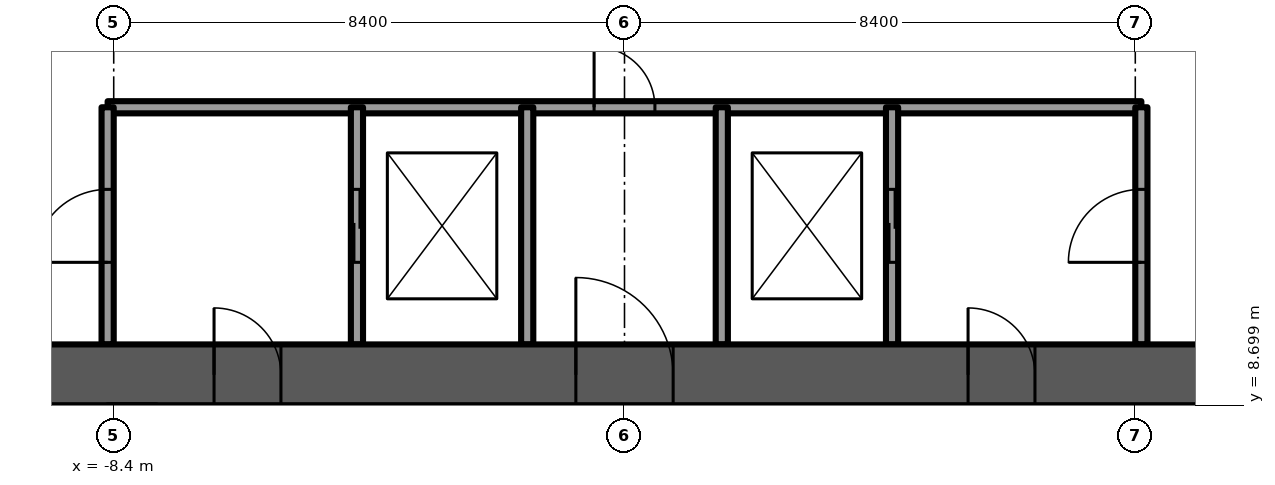
"""IFC4 building model, lengths in metres.
Left out: names, types, materials, properties, quantities, classifications, styles, units other than length and angle.
Written with IfcOpenShell. Run it as: python <this file> out.ifc"""

import sys

from ifc_helpers import new_model, si_unit, direction, frame, frame_2d, origin, place, context, subcontext, project, spatial, rectangle, extrude, element, fill, save


model = new_model("IFC4")
c1 = context("Model", 3, precision=1e-05, world=origin(), true_north=direction((0.0, 1.0)))
c2 = subcontext(c1, "Body", "Model", "MODEL_VIEW")
j1 = project(units=[si_unit("LENGTHUNIT", "METRE"), si_unit("PLANEANGLEUNIT", "RADIAN")], contexts=[c1])
p1 = place(None, origin())
s1 = spatial("IfcSite", under=j1, at=p1, CompositionType="ELEMENT")
p2 = place(p1, origin())
s2 = spatial("IfcBuilding", under=s1, at=p2, CompositionType="ELEMENT")
p3 = place(p2, frame((0.0, 0.0, 93.0)))
s3 = spatial("IfcBuildingStorey", under=s2, at=p3, CompositionType="ELEMENT", Elevation=93.0)
p4 = place(p3, frame((-12.0, 9.2, -0.3), z_axis=(0.0, 0.0, 1.0), x_axis=(1.0, 0.0, 0.0)))
e1 = element("IfcWall", 1, at=p4, inside=s3, PredefinedType="SHEAR", context=c2, shape_type="SweptSolid", body=[
    extrude(rectangle(XDim=24.0, YDim=1.0, at=frame_2d((12.0, 0.0))), origin(), (0.0, 0.0, 1.0), 3.75),
])
p5 = place(p4, frame((11.2, 0.0, 0.0)))
e2 = element("IfcOpeningElement", 2, at=p5, cuts=e1, PredefinedType="OPENING", context=c2, shape_type="SweptSolid", body=[
    extrude(rectangle(XDim=1.6, YDim=2.1, at=frame_2d((0.8, 1.05))), frame((0.0, 0.5, 0.0), z_axis=(0.0, -1.0, 0.0), x_axis=(1.0, 0.0, 0.0)), (0.0, 0.0, 1.0), 1.0),
])
p6 = place(p4, frame((5.25, 0.0, 0.0)))
e3 = element("IfcOpeningElement", 3, at=p6, cuts=e1, PredefinedType="OPENING", context=c2, shape_type="SweptSolid", body=[
    extrude(rectangle(XDim=1.1, YDim=2.1, at=frame_2d((0.55, 1.05))), frame((0.0, 0.5, 0.0), z_axis=(0.0, -1.0, 0.0), x_axis=(1.0, 0.0, 0.0)), (0.0, 0.0, 1.0), 1.0),
])
p7 = place(p4, frame((17.65, 0.0, 0.0)))
e4 = element("IfcOpeningElement", 4, at=p7, cuts=e1, PredefinedType="OPENING", context=c2, shape_type="SweptSolid", body=[
    extrude(rectangle(XDim=1.1, YDim=2.1, at=frame_2d((0.55, 1.05))), frame((0.0, 0.5, 0.0), z_axis=(0.0, -1.0, 0.0), x_axis=(1.0, 0.0, 0.0)), (0.0, 0.0, 1.0), 1.0),
])
p8 = place(p3, frame((-8.5, 13.6, 0.0), z_axis=(0.0, 0.0, 1.0), x_axis=(1.0, 0.0, 0.0)))
e5 = element("IfcWall", 5, at=p8, inside=s3, PredefinedType="PARTITIONING", context=c2, shape_type="SweptSolid", body=[
    extrude(rectangle(XDim=17.0, YDim=0.2, at=frame_2d((8.5, 0.0))), origin(), (0.0, 0.0, 1.0), 3.45),
])
p9 = place(p8, frame((8.0, 0.0, 0.0)))
e6 = element("IfcOpeningElement", 6, at=p9, cuts=e5, PredefinedType="OPENING", context=c2, shape_type="SweptSolid", body=[
    extrude(rectangle(XDim=1.0, YDim=2.1, at=frame_2d((0.5, 1.05))), frame((0.0, 0.1, 0.0), z_axis=(0.0, -1.0, 0.0), x_axis=(1.0, 0.0, 0.0)), (0.0, 0.0, 1.0), 0.2),
])
p10 = place(p3, frame((-8.5, 9.7, 0.0), z_axis=(0.0, 0.0, 1.0), x_axis=(0.0, 1.0, 0.0)))
e7 = element("IfcWall", 7, at=p10, inside=s3, PredefinedType="PARTITIONING", context=c2, shape_type="SweptSolid", body=[
    extrude(rectangle(XDim=3.9, YDim=0.2, at=frame_2d((1.95, 0.0))), origin(), (0.0, 0.0, 1.0), 3.45),
])
p11 = place(p10, frame((1.35, 0.0, 0.0)))
e8 = element("IfcOpeningElement", 8, at=p11, cuts=e7, PredefinedType="OPENING", context=c2, shape_type="SweptSolid", body=[
    extrude(rectangle(XDim=1.2, YDim=2.1, at=frame_2d((0.6, 1.05))), frame((0.0, 0.1, 0.0), z_axis=(0.0, -1.0, 0.0), x_axis=(1.0, 0.0, 0.0)), (0.0, 0.0, 1.0), 0.2),
])
p12 = place(p3, frame((8.5, 9.7, 0.0), z_axis=(0.0, 0.0, 1.0), x_axis=(0.0, 1.0, 0.0)))
e9 = element("IfcWall", 9, at=p12, inside=s3, PredefinedType="PARTITIONING", context=c2, shape_type="SweptSolid", body=[
    extrude(rectangle(XDim=3.9, YDim=0.2, at=frame_2d((1.95, 0.0))), origin(), (0.0, 0.0, 1.0), 3.45),
])
p13 = place(p12, frame((1.35, 0.0, 0.0)))
e10 = element("IfcOpeningElement", 10, at=p13, cuts=e9, PredefinedType="OPENING", context=c2, shape_type="SweptSolid", body=[
    extrude(rectangle(XDim=1.2, YDim=2.1, at=frame_2d((0.6, 1.05))), frame((0.0, 0.1, 0.0), z_axis=(0.0, -1.0, 0.0), x_axis=(1.0, 0.0, 0.0)), (0.0, 0.0, 1.0), 0.2),
])
p14 = place(p3, frame((-4.4, 9.7, 0.0), z_axis=(0.0, 0.0, 1.0), x_axis=(0.0, 1.0, 0.0)))
e11 = element("IfcWall", 11, at=p14, inside=s3, PredefinedType="PARTITIONING", context=c2, shape_type="SweptSolid", body=[
    extrude(rectangle(XDim=3.9, YDim=0.2, at=frame_2d((1.95, 0.0))), origin(), (0.0, 0.0, 1.0), 3.45),
])
p15 = place(p14, frame((1.35, 0.0, 0.0)))
e12 = element("IfcOpeningElement", 12, at=p15, cuts=e11, PredefinedType="OPENING", context=c2, shape_type="SweptSolid", body=[
    extrude(rectangle(XDim=1.2, YDim=2.1, at=frame_2d((0.6, 1.05))), frame((0.0, 0.1, 0.0), z_axis=(0.0, -1.0, 0.0), x_axis=(1.0, 0.0, 0.0)), (0.0, 0.0, 1.0), 0.2),
])
p16 = place(p3, frame((4.4, 9.7, 0.0), z_axis=(0.0, 0.0, 1.0), x_axis=(0.0, 1.0, 0.0)))
e13 = element("IfcWall", 13, at=p16, inside=s3, PredefinedType="PARTITIONING", context=c2, shape_type="SweptSolid", body=[
    extrude(rectangle(XDim=3.9, YDim=0.2, at=frame_2d((1.95, 0.0))), origin(), (0.0, 0.0, 1.0), 3.45),
])
p17 = place(p16, frame((1.35, 0.0, 0.0)))
e14 = element("IfcOpeningElement", 14, at=p17, cuts=e13, PredefinedType="OPENING", context=c2, shape_type="SweptSolid", body=[
    extrude(rectangle(XDim=1.2, YDim=2.1, at=frame_2d((0.6, 1.05))), frame((0.0, 0.1, 0.0), z_axis=(0.0, -1.0, 0.0), x_axis=(1.0, 0.0, 0.0)), (0.0, 0.0, 1.0), 0.2),
])
for number, where, z_axis, x_axis in (
    (15, (-1.6, 9.7, 0.0), (0.0, 0.0, 1.0), (0.0, 1.0, 0.0)),
    (16, (1.6, 9.7, 0.0), (0.0, 0.0, 1.0), (0.0, 1.0, 0.0)),
):
    element("IfcWall", number, at=place(p3, frame(where, z_axis=z_axis, x_axis=x_axis)), inside=s3, PredefinedType="PARTITIONING", context=c2, shape_type="SweptSolid", body=[
        extrude(rectangle(XDim=3.9, YDim=0.2, at=frame_2d((1.95, 0.0))), origin(), (0.0, 0.0, 1.0), 3.45),
    ])
p18 = place(p5, origin())
e17 = element("IfcDoor", 17, at=p18, inside=s3, OperationType="DOUBLE_DOOR_SINGLE_SWING", PredefinedType="DOOR", context=c2, shape_type="SweptSolid", body=[
    extrude(rectangle(XDim=1.6, YDim=2.1, at=frame_2d((0.8, 1.05))), frame((0.0, 0.025, 0.0), z_axis=(0.0, -1.0, 0.0), x_axis=(1.0, 0.0, 0.0)), (0.0, 0.0, 1.0), 0.05),
])
fill(e2, e17)
p19 = place(p6, origin())
e18 = element("IfcDoor", 18, at=p19, inside=s3, OperationType="SINGLE_SWING_LEFT", PredefinedType="DOOR", context=c2, shape_type="SweptSolid", body=[
    extrude(rectangle(XDim=1.1, YDim=2.1, at=frame_2d((0.55, 1.05))), frame((0.0, 0.025, 0.0), z_axis=(0.0, -1.0, 0.0), x_axis=(1.0, 0.0, 0.0)), (0.0, 0.0, 1.0), 0.05),
])
fill(e3, e18)
p20 = place(p7, origin())
e19 = element("IfcDoor", 19, at=p20, inside=s3, OperationType="SINGLE_SWING_RIGHT", PredefinedType="DOOR", context=c2, shape_type="SweptSolid", body=[
    extrude(rectangle(XDim=1.1, YDim=2.1, at=frame_2d((0.55, 1.05))), frame((0.0, 0.025, 0.0), z_axis=(0.0, -1.0, 0.0), x_axis=(1.0, 0.0, 0.0)), (0.0, 0.0, 1.0), 0.05),
])
fill(e4, e19)
p21 = place(p15, origin())
e20 = element("IfcDoor", 20, at=p21, inside=s3, OperationType="SLIDING_TO_LEFT", PredefinedType="DOOR", context=c2, shape_type="SweptSolid", body=[
    extrude(rectangle(XDim=1.2, YDim=2.1, at=frame_2d((0.6, 1.05))), frame((0.0, 0.025, 0.0), z_axis=(0.0, -1.0, 0.0), x_axis=(1.0, 0.0, 0.0)), (0.0, 0.0, 1.0), 0.05),
])
fill(e12, e20)
p22 = place(p11, origin())
e21 = element("IfcDoor", 21, at=p22, inside=s3, OperationType="SINGLE_SWING_LEFT", PredefinedType="DOOR", context=c2, shape_type="SweptSolid", body=[
    extrude(rectangle(XDim=1.2, YDim=2.1, at=frame_2d((0.6, 1.05))), frame((0.0, 0.025, 0.0), z_axis=(0.0, -1.0, 0.0), x_axis=(1.0, 0.0, 0.0)), (0.0, 0.0, 1.0), 0.05),
])
fill(e8, e21)
p23 = place(p17, origin())
e22 = element("IfcDoor", 22, at=p23, inside=s3, OperationType="SLIDING_TO_LEFT", PredefinedType="DOOR", context=c2, shape_type="SweptSolid", body=[
    extrude(rectangle(XDim=1.2, YDim=2.1, at=frame_2d((0.6, 1.05))), frame((0.0, 0.025, 0.0), z_axis=(0.0, -1.0, 0.0), x_axis=(1.0, 0.0, 0.0)), (0.0, 0.0, 1.0), 0.05),
])
fill(e14, e22)
p24 = place(p13, origin())
e23 = element("IfcDoor", 23, at=p24, inside=s3, OperationType="SINGLE_SWING_LEFT", PredefinedType="DOOR", context=c2, shape_type="SweptSolid", body=[
    extrude(rectangle(XDim=1.2, YDim=2.1, at=frame_2d((0.6, 1.05))), frame((0.0, 0.025, 0.0), z_axis=(0.0, -1.0, 0.0), x_axis=(1.0, 0.0, 0.0)), (0.0, 0.0, 1.0), 0.05),
])
fill(e10, e23)
p25 = place(p9, origin())
e24 = element("IfcDoor", 24, at=p25, inside=s3, OperationType="SINGLE_SWING_LEFT", PredefinedType="DOOR", context=c2, shape_type="SweptSolid", body=[
    extrude(rectangle(XDim=1.0, YDim=2.1, at=frame_2d((0.5, 1.05))), frame((0.0, 0.025, 0.0), z_axis=(0.0, -1.0, 0.0), x_axis=(1.0, 0.0, 0.0)), (0.0, 0.0, 1.0), 0.05),
])
fill(e6, e24)
save(model, sys.argv[1])
